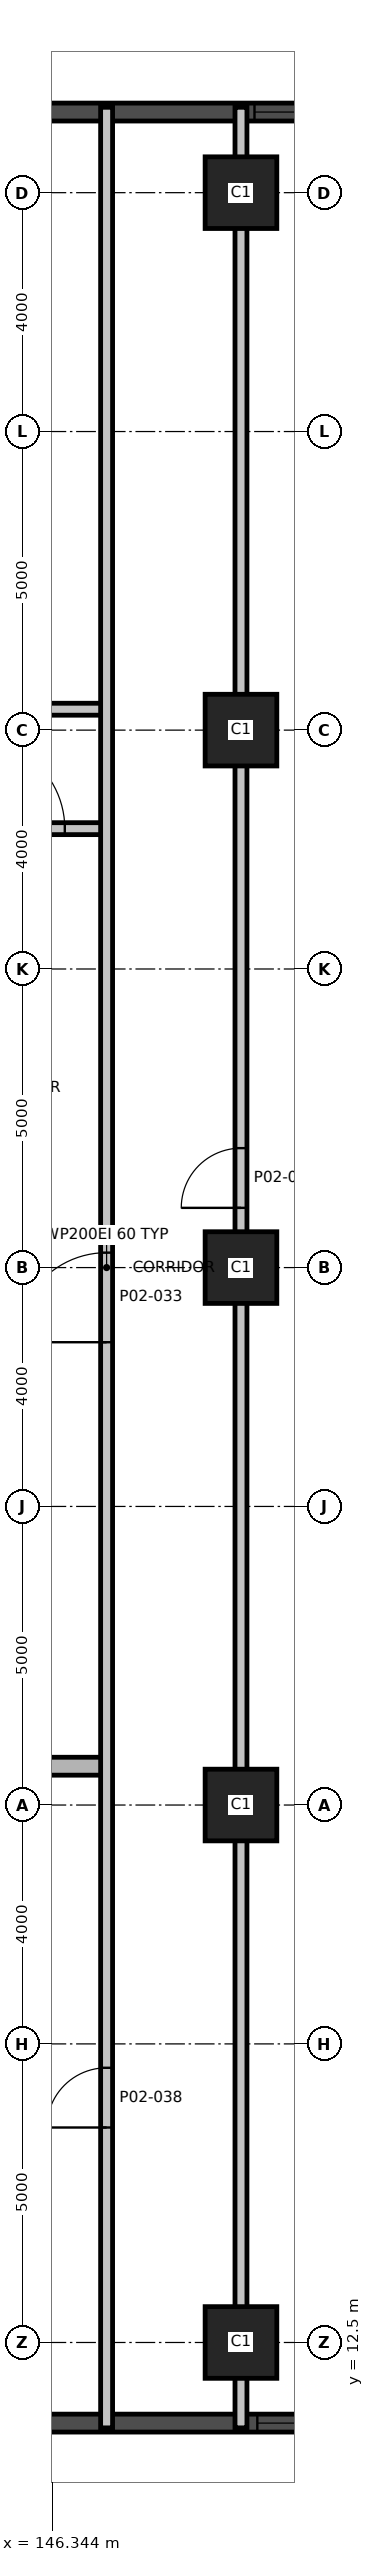
"""IFC4 building model, lengths in metres.
Left out: names, types, materials, properties, quantities, classifications, styles, units other than length and angle.
Written with IfcOpenShell. Run it as: python <this file> out.ifc"""

import sys

from ifc_helpers import new_model, si_unit, direction, frame, frame_2d, origin, origin_2d, place, context, subcontext, project, spatial, rectangle, extrude, element, fill, save


model = new_model("IFC4")
c1 = context("Model", 3, precision=1e-05, world=origin(), true_north=direction((0.0, 1.0)))
c2 = subcontext(c1, "Body", "Model", "MODEL_VIEW")
j1 = project(units=[si_unit("LENGTHUNIT", "METRE"), si_unit("PLANEANGLEUNIT", "RADIAN")], contexts=[c1])
p1 = place(None, origin())
s1 = spatial("IfcSite", under=j1, at=p1, CompositionType="ELEMENT")
p2 = place(p1, origin())
s2 = spatial("IfcBuilding", under=s1, at=p2, CompositionType="ELEMENT")
p3 = place(p2, frame((0.0, 0.0, 13.5)))
s3 = spatial("IfcBuildingStorey", under=s2, at=p3, CompositionType="ELEMENT", Elevation=13.5)
for number, where, z_axis, x_axis in (
    (1, (149.5, 12.5, 0.0), (0.0, 0.0, 1.0), (1.0, 0.0, 0.0)),
    (2, (149.5, 21.5, 0.0), (0.0, 0.0, 1.0), (1.0, 0.0, 0.0)),
    (3, (149.5, 30.5, 0.0), (0.0, 0.0, 1.0), (1.0, 0.0, 0.0)),
    (4, (149.5, 39.5, 0.0), (0.0, 0.0, 1.0), (1.0, 0.0, 0.0)),
    (5, (149.5, 48.5, 0.0), (0.0, 0.0, 1.0), (1.0, 0.0, 0.0)),
):
    element("IfcColumn", number, at=place(p3, frame(where, z_axis=z_axis, x_axis=x_axis)), inside=s3, PredefinedType="COLUMN", context=c2, shape_type="SweptSolid", body=[
        extrude(rectangle(XDim=1.2, YDim=1.2, at=origin_2d()), origin(), (0.0, 0.0, 1.0), 5.0),
    ])
p4 = place(p3, frame((118.048, 11.15, 0.0), z_axis=(0.0, 0.0, 1.0), x_axis=(1.0, 0.0, 0.0)))
e6 = element("IfcWall", 6, at=p4, inside=s3, PredefinedType="SOLIDWALL", context=c2, shape_type="SweptSolid", body=[
    extrude(rectangle(XDim=35.88, YDim=0.3, at=frame_2d((17.94, 0.0))), origin(), (0.0, 0.0, 1.0), 4.7),
])
p5 = place(p4, frame((4.202, 0.0, 0.9)))
e7 = element("IfcOpeningElement", 7, at=p5, cuts=e6, PredefinedType="OPENING", context=c2, shape_type="SweptSolid", body=[
    extrude(rectangle(XDim=3.0, YDim=2.4, at=frame_2d((1.5, 1.2))), frame((0.0, 0.16, 0.0), z_axis=(0.0, -1.0, 0.0), x_axis=(1.0, 0.0, 0.0)), (0.0, 0.0, 1.0), 0.32),
])
p6 = place(p4, frame((8.702, 0.0, 0.9)))
e8 = element("IfcOpeningElement", 8, at=p6, cuts=e6, PredefinedType="OPENING", context=c2, shape_type="SweptSolid", body=[
    extrude(rectangle(XDim=3.0, YDim=2.4, at=frame_2d((1.5, 1.2))), frame((0.0, 0.16, 0.0), z_axis=(0.0, -1.0, 0.0), x_axis=(1.0, 0.0, 0.0)), (0.0, 0.0, 1.0), 0.32),
])
p7 = place(p4, frame((13.202, 0.0, 0.9)))
e9 = element("IfcOpeningElement", 9, at=p7, cuts=e6, PredefinedType="OPENING", context=c2, shape_type="SweptSolid", body=[
    extrude(rectangle(XDim=3.0, YDim=2.4, at=frame_2d((1.5, 1.2))), frame((0.0, 0.16, 0.0), z_axis=(0.0, -1.0, 0.0), x_axis=(1.0, 0.0, 0.0)), (0.0, 0.0, 1.0), 0.32),
])
p8 = place(p4, frame((22.202, 0.0, 0.9)))
e10 = element("IfcOpeningElement", 10, at=p8, cuts=e6, PredefinedType="OPENING", context=c2, shape_type="SweptSolid", body=[
    extrude(rectangle(XDim=3.0, YDim=2.4, at=frame_2d((1.5, 1.2))), frame((0.0, 0.16, 0.0), z_axis=(0.0, -1.0, 0.0), x_axis=(1.0, 0.0, 0.0)), (0.0, 0.0, 1.0), 0.32),
])
p9 = place(p4, frame((31.726, 0.0, 0.9)))
e11 = element("IfcOpeningElement", 11, at=p9, cuts=e6, PredefinedType="OPENING", context=c2, shape_type="SweptSolid", body=[
    extrude(rectangle(XDim=3.0, YDim=2.4, at=frame_2d((1.5, 1.2))), frame((0.0, 0.16, 0.0), z_axis=(0.0, -1.0, 0.0), x_axis=(1.0, 0.0, 0.0)), (0.0, 0.0, 1.0), 0.32),
])
p10 = place(p3, frame((153.952, 49.85, 0.0), z_axis=(0.0, 0.0, 1.0), x_axis=(-1.0, 0.0, 0.0)))
e12 = element("IfcWall", 12, at=p10, inside=s3, PredefinedType="SOLIDWALL", context=c2, shape_type="SweptSolid", body=[
    extrude(rectangle(XDim=35.88, YDim=0.3, at=frame_2d((17.94, 0.0))), origin(), (0.0, 0.0, 1.0), 4.7),
])
p11 = place(p10, frame((1.226, 0.0, 0.9)))
e13 = element("IfcOpeningElement", 13, at=p11, cuts=e12, PredefinedType="OPENING", context=c2, shape_type="SweptSolid", body=[
    extrude(rectangle(XDim=3.0, YDim=2.4, at=frame_2d((1.5, 1.2))), frame((0.0, 0.16, 0.0), z_axis=(0.0, -1.0, 0.0), x_axis=(1.0, 0.0, 0.0)), (0.0, 0.0, 1.0), 0.32),
])
p12 = place(p10, frame((10.702, 0.0, 0.9)))
e14 = element("IfcOpeningElement", 14, at=p12, cuts=e12, PredefinedType="OPENING", context=c2, shape_type="SweptSolid", body=[
    extrude(rectangle(XDim=3.0, YDim=2.4, at=frame_2d((1.5, 1.2))), frame((0.0, 0.16, 0.0), z_axis=(0.0, -1.0, 0.0), x_axis=(1.0, 0.0, 0.0)), (0.0, 0.0, 1.0), 0.32),
])
p13 = place(p10, frame((15.202, 0.0, 0.9)))
e15 = element("IfcOpeningElement", 15, at=p13, cuts=e12, PredefinedType="OPENING", context=c2, shape_type="SweptSolid", body=[
    extrude(rectangle(XDim=3.0, YDim=2.4, at=frame_2d((1.5, 1.2))), frame((0.0, 0.16, 0.0), z_axis=(0.0, -1.0, 0.0), x_axis=(1.0, 0.0, 0.0)), (0.0, 0.0, 1.0), 0.32),
])
p14 = place(p10, frame((19.702, 0.0, 0.9)))
e16 = element("IfcOpeningElement", 16, at=p14, cuts=e12, PredefinedType="OPENING", context=c2, shape_type="SweptSolid", body=[
    extrude(rectangle(XDim=3.0, YDim=2.4, at=frame_2d((1.5, 1.2))), frame((0.0, 0.16, 0.0), z_axis=(0.0, -1.0, 0.0), x_axis=(1.0, 0.0, 0.0)), (0.0, 0.0, 1.0), 0.32),
])
p15 = place(p10, frame((24.202, 0.0, 0.9)))
e17 = element("IfcOpeningElement", 17, at=p15, cuts=e12, PredefinedType="OPENING", context=c2, shape_type="SweptSolid", body=[
    extrude(rectangle(XDim=3.0, YDim=2.4, at=frame_2d((1.5, 1.2))), frame((0.0, 0.16, 0.0), z_axis=(0.0, -1.0, 0.0), x_axis=(1.0, 0.0, 0.0)), (0.0, 0.0, 1.0), 0.32),
])
p16 = place(p10, frame((28.702, 0.0, 0.9)))
e18 = element("IfcOpeningElement", 18, at=p16, cuts=e12, PredefinedType="OPENING", context=c2, shape_type="SweptSolid", body=[
    extrude(rectangle(XDim=3.0, YDim=2.4, at=frame_2d((1.5, 1.2))), frame((0.0, 0.16, 0.0), z_axis=(0.0, -1.0, 0.0), x_axis=(1.0, 0.0, 0.0)), (0.0, 0.0, 1.0), 0.32),
])
p17 = place(p3, frame((125.75, 22.15, 0.0), z_axis=(0.0, 0.0, 1.0), x_axis=(1.0, 0.0, 0.0)))
e19 = element("IfcWall", 19, at=p17, inside=s3, PredefinedType="SHEAR", context=c2, shape_type="SweptSolid", body=[
    extrude(rectangle(XDim=21.5, YDim=0.3, at=frame_2d((10.75, 0.0))), origin(), (0.0, 0.0, 1.0), 4.7),
])
p18 = place(p17, frame((17.0, 0.0, 0.0)))
e20 = element("IfcOpeningElement", 20, at=p18, cuts=e19, PredefinedType="OPENING", context=c2, shape_type="SweptSolid", body=[
    extrude(rectangle(XDim=1.0, YDim=2.1, at=frame_2d((0.5, 1.05))), frame((0.0, 0.16, 0.0), z_axis=(0.0, -1.0, 0.0), x_axis=(1.0, 0.0, 0.0)), (0.0, 0.0, 1.0), 0.32),
])
p19 = place(p17, frame((3.15, 0.0, 0.0)))
e21 = element("IfcOpeningElement", 21, at=p19, cuts=e19, PredefinedType="OPENING", context=c2, shape_type="SweptSolid", body=[
    extrude(rectangle(XDim=1.6, YDim=2.1, at=frame_2d((0.8, 1.05))), frame((0.0, 0.16, 0.0), z_axis=(0.0, -1.0, 0.0), x_axis=(1.0, 0.0, 0.0)), (0.0, 0.0, 1.0), 0.32),
])
p20 = place(p3, frame((144.02, 37.85, 0.0), z_axis=(0.0, 0.0, 1.0), x_axis=(1.0, 0.0, 0.0)))
e22 = element("IfcWall", 22, at=p20, inside=s3, PredefinedType="PARTITIONING", context=c2, shape_type="SweptSolid", body=[
    extrude(rectangle(XDim=3.23, YDim=0.2, at=frame_2d((1.615, 0.0))), origin(), (0.0, 0.0, 1.0), 4.7),
])
p21 = place(p20, frame((1.03, 0.0, 0.0)))
e23 = element("IfcOpeningElement", 23, at=p21, cuts=e22, PredefinedType="OPENING", context=c2, shape_type="SweptSolid", body=[
    extrude(rectangle(XDim=1.5, YDim=2.1, at=frame_2d((0.75, 1.05))), frame((0.0, 0.11, 0.0), z_axis=(0.0, -1.0, 0.0), x_axis=(1.0, 0.0, 0.0)), (0.0, 0.0, 1.0), 0.22),
])
p22 = place(p3, frame((143.0, 39.85, 0.0), z_axis=(0.0, 0.0, 1.0), x_axis=(1.0, 0.0, 0.0)))
e24 = element("IfcWall", 24, at=p22, inside=s3, PredefinedType="PARTITIONING", context=c2, shape_type="SweptSolid", body=[
    extrude(rectangle(XDim=4.25, YDim=0.2, at=frame_2d((2.125, 0.0))), origin(), (0.0, 0.0, 1.0), 4.7),
])
p23 = place(p3, frame((147.25, 11.07, 0.0), z_axis=(0.0, 0.0, 1.0), x_axis=(0.0, 1.0, 0.0)))
e25 = element("IfcWall", 25, at=p23, inside=s3, PredefinedType="PARTITIONING", context=c2, shape_type="SweptSolid", body=[
    extrude(rectangle(XDim=38.86, YDim=0.2, at=frame_2d((19.43, 0.0))), origin(), (0.0, 0.0, 1.0), 4.7),
])
p24 = place(p23, frame((18.18, 0.0, 0.0)))
e26 = element("IfcOpeningElement", 26, at=p24, cuts=e25, PredefinedType="OPENING", context=c2, shape_type="SweptSolid", body=[
    extrude(rectangle(XDim=1.5, YDim=2.1, at=frame_2d((0.75, 1.05))), frame((0.0, 0.11, 0.0), z_axis=(0.0, -1.0, 0.0), x_axis=(1.0, 0.0, 0.0)), (0.0, 0.0, 1.0), 0.22),
])
p25 = place(p23, frame((5.03, 0.0, 0.0)))
e27 = element("IfcOpeningElement", 27, at=p25, cuts=e25, PredefinedType="OPENING", context=c2, shape_type="SweptSolid", body=[
    extrude(rectangle(XDim=1.0, YDim=2.1, at=frame_2d((0.5, 1.05))), frame((0.0, 0.11, 0.0), z_axis=(0.0, -1.0, 0.0), x_axis=(1.0, 0.0, 0.0)), (0.0, 0.0, 1.0), 0.22),
])
p26 = place(p3, frame((149.5, 11.07, 0.0), z_axis=(0.0, 0.0, 1.0), x_axis=(0.0, 1.0, 0.0)))
e28 = element("IfcWall", 28, at=p26, inside=s3, PredefinedType="PARTITIONING", context=c2, shape_type="SweptSolid", body=[
    extrude(rectangle(XDim=38.86, YDim=0.2, at=frame_2d((19.43, 0.0))), origin(), (0.0, 0.0, 1.0), 4.7),
])
p27 = place(p26, frame((20.43, 0.0, 0.0)))
e29 = element("IfcOpeningElement", 29, at=p27, cuts=e28, PredefinedType="OPENING", context=c2, shape_type="SweptSolid", body=[
    extrude(rectangle(XDim=1.0, YDim=2.1, at=frame_2d((0.5, 1.05))), frame((0.0, 0.11, 0.0), z_axis=(0.0, -1.0, 0.0), x_axis=(1.0, 0.0, 0.0)), (0.0, 0.0, 1.0), 0.22),
])
p28 = place(p9, origin())
e30 = element("IfcWindow", 30, at=p28, inside=s3, PartitioningType="SINGLE_PANEL", PredefinedType="WINDOW", context=c2, shape_type="SweptSolid", body=[
    extrude(rectangle(XDim=3.0, YDim=2.4, at=frame_2d((1.5, 1.2))), frame((0.0, 0.03, 0.0), z_axis=(0.0, -1.0, 0.0), x_axis=(1.0, 0.0, 0.0)), (0.0, 0.0, 1.0), 0.06),
])
fill(e11, e30)
p29 = place(p11, origin())
e31 = element("IfcWindow", 31, at=p29, inside=s3, PartitioningType="SINGLE_PANEL", PredefinedType="WINDOW", context=c2, shape_type="SweptSolid", body=[
    extrude(rectangle(XDim=3.0, YDim=2.4, at=frame_2d((1.5, 1.2))), frame((0.0, 0.03, 0.0), z_axis=(0.0, -1.0, 0.0), x_axis=(1.0, 0.0, 0.0)), (0.0, 0.0, 1.0), 0.06),
])
fill(e13, e31)
p30 = place(p21, origin())
e32 = element("IfcDoor", 32, at=p30, inside=s3, OperationType="SINGLE_SWING_LEFT", PredefinedType="DOOR", context=c2, shape_type="SweptSolid", body=[
    extrude(rectangle(XDim=1.5, YDim=2.1, at=frame_2d((0.75, 1.05))), frame((0.0, 0.025, 0.0), z_axis=(0.0, -1.0, 0.0), x_axis=(1.0, 0.0, 0.0)), (0.0, 0.0, 1.0), 0.05),
])
fill(e23, e32)
p31 = place(p24, origin())
e33 = element("IfcDoor", 33, at=p31, inside=s3, OperationType="SINGLE_SWING_LEFT", PredefinedType="DOOR", context=c2, shape_type="SweptSolid", body=[
    extrude(rectangle(XDim=1.5, YDim=2.1, at=frame_2d((0.75, 1.05))), frame((0.0, 0.025, 0.0), z_axis=(0.0, -1.0, 0.0), x_axis=(1.0, 0.0, 0.0)), (0.0, 0.0, 1.0), 0.05),
])
fill(e26, e33)
p32 = place(p27, origin())
e34 = element("IfcDoor", 34, at=p32, inside=s3, OperationType="SINGLE_SWING_RIGHT", PredefinedType="DOOR", context=c2, shape_type="SweptSolid", body=[
    extrude(rectangle(XDim=1.0, YDim=2.1, at=frame_2d((0.5, 1.05))), frame((0.0, 0.025, 0.0), z_axis=(0.0, -1.0, 0.0), x_axis=(1.0, 0.0, 0.0)), (0.0, 0.0, 1.0), 0.05),
])
fill(e29, e34)
p33 = place(p25, origin())
e35 = element("IfcDoor", 35, at=p33, inside=s3, OperationType="SINGLE_SWING_RIGHT", PredefinedType="DOOR", context=c2, shape_type="SweptSolid", body=[
    extrude(rectangle(XDim=1.0, YDim=2.1, at=frame_2d((0.5, 1.05))), frame((0.0, 0.025, 0.0), z_axis=(0.0, -1.0, 0.0), x_axis=(1.0, 0.0, 0.0)), (0.0, 0.0, 1.0), 0.05),
])
fill(e27, e35)
save(model, sys.argv[1])
